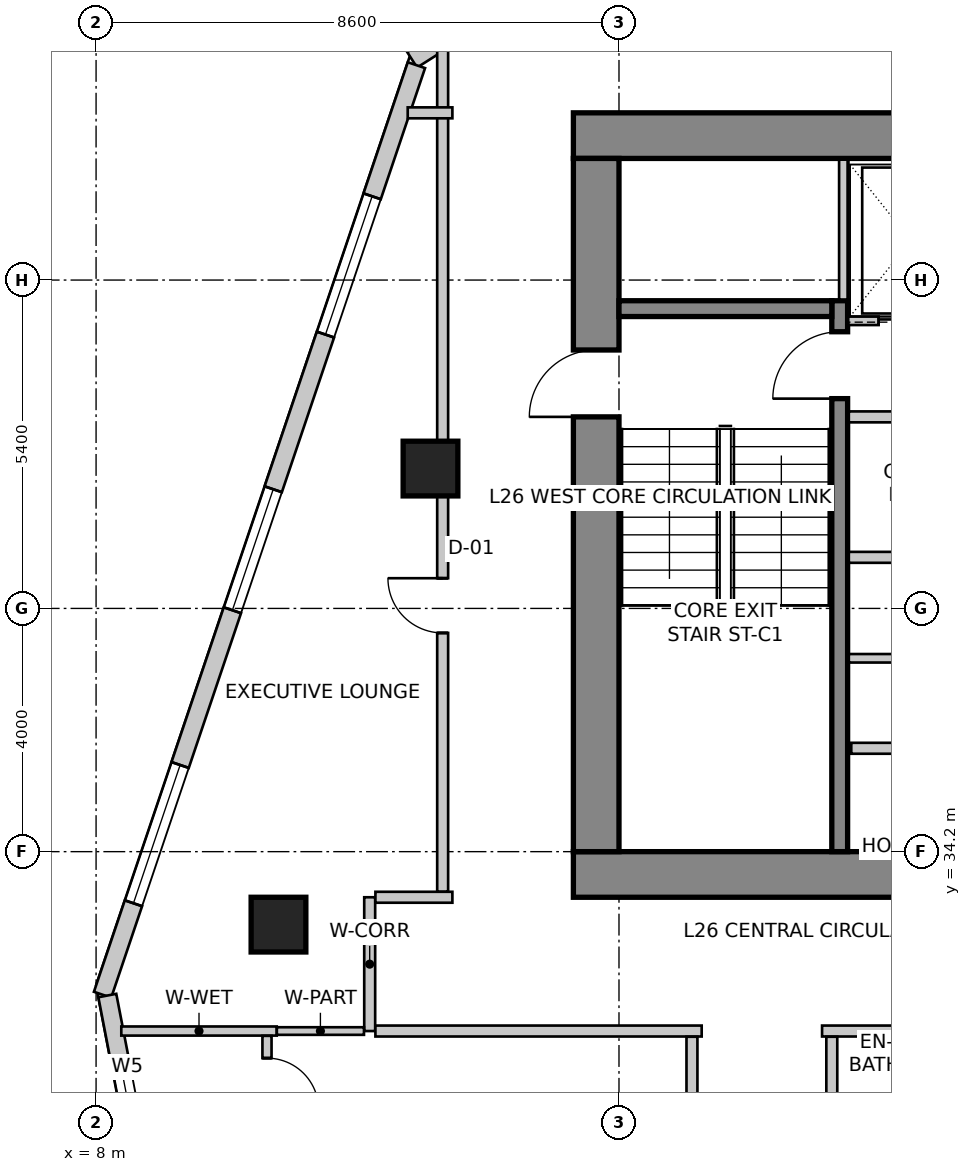
"""IFC4 building model, lengths in metres.
Left out: names, types, materials, properties, quantities, classifications, styles, units other than length and angle.
Written with IfcOpenShell. Run it as: python <this file> out.ifc"""

import sys

from ifc_helpers import new_model, si_unit, direction, frame, frame_2d, origin, origin_2d, place, context, subcontext, project, spatial, rectangle, extrude, source, transform, mapped, element, fill, save


model = new_model("IFC4")
c1 = context("Model", 3, precision=1e-05, world=origin(), true_north=direction((0.0, 1.0)))
c2 = subcontext(c1, "Body", "Model", "MODEL_VIEW")
j1 = project(units=[si_unit("LENGTHUNIT", "METRE"), si_unit("PLANEANGLEUNIT", "RADIAN")], contexts=[c1])
p1 = place(None, origin())
s1 = spatial("IfcSite", under=j1, at=p1, CompositionType="ELEMENT")
p2 = place(p1, origin())
s2 = spatial("IfcBuilding", under=s1, at=p2, CompositionType="ELEMENT")
p3 = place(p2, frame((0.0, 0.0, 110.6)))
s3 = spatial("IfcBuildingStorey", under=s2, at=p3, CompositionType="ELEMENT", Elevation=110.6)
p4 = place(p3, frame((15.85, 45.975, 0.0), z_axis=(0.0, 0.0, 1.0), x_axis=(1.0, 0.0, 0.0)))
e1 = element("IfcWall", 1, at=p4, inside=s3, PredefinedType="SHEAR", context=c2, shape_type="SweptSolid", body=[
    extrude(rectangle(XDim=15.9, YDim=0.75, at=frame_2d((7.95, 0.0))), origin(), (0.0, 0.0, 1.0), 3.6),
])
p5 = place(p3, frame((15.85, 33.825, 0.0), z_axis=(0.0, 0.0, 1.0), x_axis=(1.0, 0.0, 0.0)))
e2 = element("IfcWall", 2, at=p5, inside=s3, PredefinedType="SHEAR", context=c2, shape_type="SweptSolid", body=[
    extrude(rectangle(XDim=15.9, YDim=0.75, at=frame_2d((7.95, 0.0))), origin(), (0.0, 0.0, 1.0), 3.6),
])
m1 = source(origin(), c2, "Body", "SweptSolid", [
    extrude(rectangle(XDim=1.3, YDim=2.15, at=frame_2d((0.65, 1.075))), frame((0.0, 0.385, 0.0), z_axis=(0.0, -1.0, 0.0), x_axis=(1.0, 0.0, 0.0)), (0.0, 0.0, 1.0), 0.77),
])
p6 = place(p5, frame((10.08, 0.0, 0.0)))
e3 = element("IfcOpeningElement", 3, at=p6, cuts=e2, PredefinedType="OPENING", context=c2, shape_type="MappedRepresentation", body=[
    mapped(m1, transform((0.0, 0.0, 0.0), scale=1.0)),
])
p7 = place(p3, frame((16.225, 34.2, 0.0), z_axis=(0.0, 0.0, 1.0), x_axis=(0.0, 1.0, 0.0)))
e4 = element("IfcWall", 4, at=p7, inside=s3, PredefinedType="SHEAR", context=c2, shape_type="SweptSolid", body=[
    extrude(rectangle(XDim=11.4, YDim=0.75, at=frame_2d((5.7, 0.0))), origin(), (0.0, 0.0, 1.0), 3.6),
])
m2 = source(origin(), c2, "Body", "SweptSolid", [
    extrude(rectangle(XDim=1.1, YDim=2.15, at=frame_2d((0.55, 1.075))), frame((0.0, 0.385, 0.0), z_axis=(0.0, -1.0, 0.0), x_axis=(1.0, 0.0, 0.0)), (0.0, 0.0, 1.0), 0.77),
])
p8 = place(p7, frame((7.15, 0.0, 0.0)))
e5 = element("IfcOpeningElement", 5, at=p8, cuts=e4, PredefinedType="OPENING", context=c2, shape_type="MappedRepresentation", body=[
    mapped(m2, transform((0.0, 0.0, 0.0), scale=1.0)),
])
p9 = place(p3, frame((20.23, 34.2, 0.0), z_axis=(0.0, 0.0, 1.0), x_axis=(0.0, 1.0, 0.0)))
e6 = element("IfcWall", 6, at=p9, inside=s3, PredefinedType="SHEAR", context=c2, shape_type="SweptSolid", body=[
    extrude(rectangle(XDim=9.06, YDim=0.26, at=frame_2d((4.53, 0.0))), origin(), (0.0, 0.0, 1.0), 3.6),
])
m3 = source(origin(), c2, "Body", "SweptSolid", [
    extrude(rectangle(XDim=1.1, YDim=2.15, at=frame_2d((0.55, 1.075))), frame((0.0, 0.14, 0.0), z_axis=(0.0, -1.0, 0.0), x_axis=(1.0, 0.0, 0.0)), (0.0, 0.0, 1.0), 0.28),
])
p10 = place(p9, frame((7.45, 0.0, 0.0)))
e7 = element("IfcOpeningElement", 7, at=p10, cuts=e6, PredefinedType="OPENING", context=c2, shape_type="MappedRepresentation", body=[
    mapped(m3, transform((0.0, 0.0, 0.0), scale=1.0)),
])
p11 = place(p3, frame((16.6, 43.13, 0.0), z_axis=(0.0, 0.0, 1.0), x_axis=(1.0, 0.0, 0.0)))
e8 = element("IfcWall", 8, at=p11, inside=s3, PredefinedType="SHEAR", context=c2, shape_type="SweptSolid", body=[
    extrude(rectangle(XDim=3.5, YDim=0.26, at=frame_2d((1.75, 0.0))), origin(), (0.0, 0.0, 1.0), 3.6),
])
m4 = source(origin(), c2, "Body", "SweptSolid", [
    extrude(rectangle(XDim=0.9, YDim=0.9, at=origin_2d()), origin(), (0.0, 0.0, 1.0), 3.6),
])
for number, where, z_axis, x_axis in (
    (9, (11.0, 33.0, 0.0), (0.0, 0.0, 1.0), (1.0, 0.0, 0.0)),
    (10, (13.5, 40.5, 0.0), (0.0, 0.0, 1.0), (1.0, 0.0, 0.0)),
):
    element("IfcColumn", number, at=place(p3, frame(where, z_axis=z_axis, x_axis=x_axis)), inside=s3, PredefinedType="COLUMN", context=c2, shape_type="MappedRepresentation", body=[
        mapped(m4, transform((0.0, 0.0, 0.0), scale=1.0)),
    ])
p12 = place(p3, frame((21.875, 52.742, 0.0), z_axis=(0.0, 0.0, 1.0), x_axis=(-0.843662465249, -0.536873956092, 0.0)))
e11 = element("IfcWall", 11, at=p12, inside=s3, PredefinedType="SOLIDWALL", context=c2, shape_type="SweptSolid", body=[
    extrude(rectangle(XDim=10.284, YDim=0.3, at=frame_2d((5.142, 0.0))), origin(), (0.0, 0.0, 1.0), 3.35),
])
m5 = source(origin(), c2, "Body", "SweptSolid", [
    extrude(rectangle(XDim=2.1, YDim=2.0, at=frame_2d((1.05, 1.0))), frame((0.0, 0.16, 0.0), z_axis=(0.0, -1.0, 0.0), x_axis=(1.0, 0.0, 0.0)), (0.0, 0.0, 1.0), 0.32),
])
p13 = place(p12, frame((2.806, 0.0, 0.85)))
e12 = element("IfcOpeningElement", 12, at=p13, cuts=e11, PredefinedType="OPENING", context=c2, shape_type="MappedRepresentation", body=[
    mapped(m5, transform((0.0, 0.0, 0.0), scale=1.0)),
])
m6 = source(origin(), c2, "Body", "SweptSolid", [
    extrude(rectangle(XDim=1.2, YDim=1.6, at=frame_2d((0.6, 0.8))), frame((0.0, 0.16, 0.0), z_axis=(0.0, -1.0, 0.0), x_axis=(1.0, 0.0, 0.0)), (0.0, 0.0, 1.0), 0.32),
])
p14 = place(p12, frame((8.087, 0.0, 0.85)))
e13 = element("IfcOpeningElement", 13, at=p14, cuts=e11, PredefinedType="OPENING", context=c2, shape_type="MappedRepresentation", body=[
    mapped(m6, transform((0.0, 0.0, 0.0), scale=1.0)),
])
p15 = place(p3, frame((13.269, 47.134, 0.0), z_axis=(0.0, 0.0, 1.0), x_axis=(-0.319929596295, -0.947441319246, 0.0)))
e14 = element("IfcWall", 14, at=p15, inside=s3, PredefinedType="SOLIDWALL", context=c2, shape_type="SweptSolid", body=[
    extrude(rectangle(XDim=16.134, YDim=0.3, at=frame_2d((8.067, 0.0))), origin(), (0.0, 0.0, 1.0), 3.35),
])
m7 = source(origin(), c2, "Body", "SweptSolid", [
    extrude(rectangle(XDim=2.4, YDim=2.2, at=frame_2d((1.2, 1.1))), frame((0.0, 0.16, 0.0), z_axis=(0.0, -1.0, 0.0), x_axis=(1.0, 0.0, 0.0)), (0.0, 0.0, 1.0), 0.32),
])
p16 = place(p15, frame((2.276, 0.0, 0.85)))
e15 = element("IfcOpeningElement", 15, at=p16, cuts=e14, PredefinedType="OPENING", context=c2, shape_type="MappedRepresentation", body=[
    mapped(m7, transform((0.0, 0.0, 0.0), scale=1.0)),
])
p17 = place(p15, frame((7.361, 0.0, 0.85)))
e16 = element("IfcOpeningElement", 16, at=p17, cuts=e14, PredefinedType="OPENING", context=c2, shape_type="MappedRepresentation", body=[
    mapped(m5, transform((0.0, 0.0, 0.0), scale=1.0)),
])
p18 = place(p15, frame((12.147, 0.0, 0.85)))
e17 = element("IfcOpeningElement", 17, at=p18, cuts=e14, PredefinedType="OPENING", context=c2, shape_type="MappedRepresentation", body=[
    mapped(m7, transform((0.0, 0.0, 0.0), scale=1.0)),
])
p19 = place(p3, frame((8.185, 31.834, 0.0), z_axis=(0.0, 0.0, 1.0), x_axis=(0.189707113148, -0.981840725994, 0.0)))
e18 = element("IfcWall", 18, at=p19, inside=s3, PredefinedType="SOLIDWALL", context=c2, shape_type="SweptSolid", body=[
    extrude(rectangle(XDim=21.221, YDim=0.3, at=frame_2d((10.611, 0.0))), origin(), (0.0, 0.0, 1.0), 3.35),
])
p20 = place(p19, frame((1.127, 0.0, 0.85)))
e19 = element("IfcOpeningElement", 19, at=p20, cuts=e18, PredefinedType="OPENING", context=c2, shape_type="MappedRepresentation", body=[
    mapped(m6, transform((0.0, 0.0, 0.0), scale=1.0)),
])
p21 = place(p19, frame((4.369, 0.0, 0.85)))
e20 = element("IfcOpeningElement", 20, at=p21, cuts=e18, PredefinedType="OPENING", context=c2, shape_type="MappedRepresentation", body=[
    mapped(m5, transform((0.0, 0.0, 0.0), scale=1.0)),
])
p22 = place(p19, frame((8.521, 0.0, 0.85)))
e21 = element("IfcOpeningElement", 21, at=p22, cuts=e18, PredefinedType="OPENING", context=c2, shape_type="MappedRepresentation", body=[
    mapped(m6, transform((0.0, 0.0, 0.0), scale=1.0)),
])
p23 = place(p19, frame((12.021, 0.0, 0.85)))
e22 = element("IfcOpeningElement", 22, at=p23, cuts=e18, PredefinedType="OPENING", context=c2, shape_type="MappedRepresentation", body=[
    mapped(m5, transform((0.0, 0.0, 0.0), scale=1.0)),
])
p24 = place(p19, frame((17.091, 0.0, 0.85)))
e23 = element("IfcOpeningElement", 23, at=p24, cuts=e18, PredefinedType="OPENING", context=c2, shape_type="MappedRepresentation", body=[
    mapped(m7, transform((0.0, 0.0, 0.0), scale=1.0)),
])
p25 = place(p3, frame((20.37, 42.93, 0.0), z_axis=(0.0, 0.0, 1.0), x_axis=(1.0, 0.0, 0.0)))
e24 = element("IfcWall", 24, at=p25, inside=s3, PredefinedType="SOLIDWALL", context=c2, shape_type="SweptSolid", body=[
    extrude(rectangle(XDim=6.86, YDim=0.14, at=frame_2d((3.43, 0.0))), origin(), (0.0, 0.0, 1.0), 3.35),
])
m8 = source(origin(), c2, "Body", "SweptSolid", [
    extrude(rectangle(XDim=1.1, YDim=2.15, at=frame_2d((0.55, 1.075))), frame((0.0, 0.08, 0.0), z_axis=(0.0, -1.0, 0.0), x_axis=(1.0, 0.0, 0.0)), (0.0, 0.0, 1.0), 0.16),
])
p26 = place(p25, frame((0.5, 0.0, 0.0)))
e25 = element("IfcOpeningElement", 25, at=p26, cuts=e24, PredefinedType="OPENING", context=c2, shape_type="MappedRepresentation", body=[
    mapped(m8, transform((0.0, 0.0, 0.0), scale=1.0)),
])
p27 = place(p25, frame((2.7, 0.0, 0.0)))
e26 = element("IfcOpeningElement", 26, at=p27, cuts=e24, PredefinedType="OPENING", context=c2, shape_type="MappedRepresentation", body=[
    mapped(m8, transform((0.0, 0.0, 0.0), scale=1.0)),
])
p28 = place(p25, frame((5.1, 0.0, 0.0)))
e27 = element("IfcOpeningElement", 27, at=p28, cuts=e24, PredefinedType="OPENING", context=c2, shape_type="MappedRepresentation", body=[
    mapped(m8, transform((0.0, 0.0, 0.0), scale=1.0)),
])
p29 = place(p3, frame((20.29, 43.28, 0.0), z_axis=(0.0, 0.0, 1.0), x_axis=(0.0, 1.0, 0.0)))
e28 = element("IfcWall", 28, at=p29, inside=s3, PredefinedType="SOLIDWALL", context=c2, shape_type="SweptSolid", body=[
    extrude(rectangle(XDim=2.3, YDim=0.14, at=frame_2d((1.15, 0.0))), origin(), (0.0, 0.0, 1.0), 3.35),
])
p30 = place(p3, frame((20.38, 37.38, 0.0), z_axis=(0.0, 0.0, 1.0), x_axis=(1.0, 0.0, 0.0)))
e29 = element("IfcWall", 29, at=p30, inside=s3, PredefinedType="SOLIDWALL", context=c2, shape_type="SweptSolid", body=[
    extrude(rectangle(XDim=5.75, YDim=0.14, at=frame_2d((2.875, 0.0))), origin(), (0.0, 0.0, 1.0), 3.35),
])
p31 = place(p3, frame((20.38, 39.04, 0.0), z_axis=(0.0, 0.0, 1.0), x_axis=(1.0, 0.0, 0.0)))
e30 = element("IfcWall", 30, at=p31, inside=s3, PredefinedType="SOLIDWALL", context=c2, shape_type="SweptSolid", body=[
    extrude(rectangle(XDim=5.75, YDim=0.18, at=frame_2d((2.875, 0.0))), origin(), (0.0, 0.0, 1.0), 3.35),
])
p32 = place(p3, frame((24.81, 41.35, 0.0), z_axis=(0.0, 0.0, 1.0), x_axis=(-1.0, 0.0, 0.0)))
e31 = element("IfcWall", 31, at=p32, inside=s3, PredefinedType="PARTITIONING", context=c2, shape_type="SweptSolid", body=[
    extrude(rectangle(XDim=4.43, YDim=0.18, at=frame_2d((2.215, 0.0))), origin(), (0.0, 0.0, 1.0), 3.35),
])
p33 = place(p3, frame((20.42, 35.9, 0.0), z_axis=(0.0, 0.0, 1.0), x_axis=(1.0, 0.0, 0.0)))
e32 = element("IfcWall", 32, at=p33, inside=s3, PredefinedType="PARTITIONING", context=c2, shape_type="SweptSolid", body=[
    extrude(rectangle(XDim=2.62, YDim=0.18, at=frame_2d((1.31, 0.0))), origin(), (0.0, 0.0, 1.0), 3.35),
])
m9 = source(origin(), c2, "Body", "SweptSolid", [
    extrude(rectangle(XDim=0.9, YDim=2.15, at=frame_2d((0.45, 1.075))), frame((0.0, 0.1, 0.0), z_axis=(0.0, -1.0, 0.0), x_axis=(1.0, 0.0, 0.0)), (0.0, 0.0, 1.0), 0.2),
])
p34 = place(p33, frame((0.796, 0.0, 0.0)))
e33 = element("IfcOpeningElement", 33, at=p34, cuts=e32, PredefinedType="OPENING", context=c2, shape_type="MappedRepresentation", body=[
    mapped(m9, transform((0.0, 0.0, 0.0), scale=1.0)),
])
p35 = place(p3, frame((12.5, 31.25, 0.0), z_axis=(0.0, 0.0, 1.0), x_axis=(0.0, 1.0, 0.0)))
e34 = element("IfcWall", 34, at=p35, inside=s3, PredefinedType="PARTITIONING", context=c2, shape_type="SweptSolid", body=[
    extrude(rectangle(XDim=2.2, YDim=0.18, at=frame_2d((1.1, 0.0))), origin(), (0.0, 0.0, 1.0), 3.034),
])
p36 = place(p3, frame((12.594, 33.45, 0.0), z_axis=(0.0, 0.0, 1.0), x_axis=(1.0, 0.0, 0.0)))
e35 = element("IfcWall", 35, at=p36, inside=s3, PredefinedType="PARTITIONING", context=c2, shape_type="SweptSolid", body=[
    extrude(rectangle(XDim=1.266, YDim=0.18, at=frame_2d((0.633, 0.0))), origin(), (0.0, 0.0, 1.0), 3.35),
])
p37 = place(p3, frame((17.96, 31.25, 0.0), z_axis=(0.0, 0.0, 1.0), x_axis=(-1.0, 0.0, 0.0)))
e36 = element("IfcWall", 36, at=p37, inside=s3, PredefinedType="PARTITIONING", context=c2, shape_type="SweptSolid", body=[
    extrude(rectangle(XDim=5.366, YDim=0.18, at=frame_2d((2.683, 0.0))), origin(), (0.0, 0.0, 1.0), 3.034),
])
p38 = place(p3, frame((22.66, 31.25, 0.0), z_axis=(0.0, 0.0, 1.0), x_axis=(-1.0, 0.0, 0.0)))
e37 = element("IfcWall", 37, at=p38, inside=s3, PredefinedType="PARTITIONING", context=c2, shape_type="SweptSolid", body=[
    extrude(rectangle(XDim=2.72, YDim=0.18, at=frame_2d((1.36, 0.0))), origin(), (0.0, 0.0, 1.0), 3.034),
])
p39 = place(p3, frame((13.7, 33.544, 0.0), z_axis=(0.0, 0.0, 1.0), x_axis=(0.0, 1.0, 0.0)))
e38 = element("IfcWall", 38, at=p39, inside=s3, PredefinedType="PARTITIONING", context=c2, shape_type="SweptSolid", body=[
    extrude(rectangle(XDim=13.86, YDim=0.18, at=frame_2d((6.93, 0.0))), origin(), (0.0, 0.0, 1.0), 2.492),
])
p40 = place(p39, frame((4.253, 0.0, 0.0)))
e39 = element("IfcOpeningElement", 39, at=p40, cuts=e38, PredefinedType="OPENING", context=c2, shape_type="MappedRepresentation", body=[
    mapped(m9, transform((0.0, 0.0, 0.0), scale=1.0)),
])
p41 = place(p3, frame((13.86, 46.35, 0.0), z_axis=(0.0, 0.0, 1.0), x_axis=(-1.0, 0.0, 0.0)))
e40 = element("IfcWall", 40, at=p41, inside=s3, PredefinedType="PARTITIONING", context=c2, shape_type="SweptSolid", body=[
    extrude(rectangle(XDim=0.735, YDim=0.18, at=frame_2d((0.367, 0.0))), origin(), (0.0, 0.0, 1.0), 3.35),
])
p42 = place(p3, frame((10.971, 31.25, 0.0), z_axis=(0.0, 0.0, 1.0), x_axis=(-1.0, 0.0, 0.0)))
e41 = element("IfcWall", 41, at=p42, inside=s3, PredefinedType="PARTITIONING", context=c2, shape_type="SweptSolid", body=[
    extrude(rectangle(XDim=2.556, YDim=0.15, at=frame_2d((1.278, 0.0))), origin(), (0.0, 0.0, 1.0), 2.492),
])
p43 = place(p3, frame((12.406, 31.25, 0.0), z_axis=(0.0, 0.0, 1.0), x_axis=(-1.0, 0.0, 0.0)))
e42 = element("IfcWall", 42, at=p43, inside=s3, PredefinedType="PARTITIONING", context=c2, shape_type="SweptSolid", body=[
    extrude(rectangle(XDim=1.433, YDim=0.125, at=frame_2d((0.717, 0.0))), origin(), (0.0, 0.0, 1.0), 2.492),
])
p44 = place(p3, frame((17.8, 24.162, 0.0), z_axis=(0.0, 0.0, 1.0), x_axis=(0.0, 1.0, 0.0)))
e43 = element("IfcWall", 43, at=p44, inside=s3, PredefinedType="PARTITIONING", context=c2, shape_type="SweptSolid", body=[
    extrude(rectangle(XDim=6.994, YDim=0.18, at=frame_2d((3.497, 0.0))), origin(), (0.0, 0.0, 1.0), 2.803),
])
p45 = place(p44, frame((3.047, 0.0, 0.0)))
e44 = element("IfcOpeningElement", 44, at=p45, cuts=e43, PredefinedType="OPENING", context=c2, shape_type="MappedRepresentation", body=[
    mapped(m9, transform((0.0, 0.0, 0.0), scale=1.0)),
])
p46 = place(p3, frame((20.1, 31.156, 0.0), z_axis=(0.0, 0.0, 1.0), x_axis=(0.0, -1.0, 0.0)))
e45 = element("IfcWall", 45, at=p46, inside=s3, PredefinedType="PARTITIONING", context=c2, shape_type="SweptSolid", body=[
    extrude(rectangle(XDim=2.266, YDim=0.18, at=frame_2d((1.133, 0.0))), origin(), (0.0, 0.0, 1.0), 3.034),
])
p47 = place(p3, frame((10.811, 31.171, 0.0), z_axis=(0.0, 0.0, 1.0), x_axis=(0.0, -1.0, 0.0)))
e46 = element("IfcWall", 46, at=p47, inside=s3, PredefinedType="PARTITIONING", context=c2, shape_type="SweptSolid", body=[
    extrude(rectangle(XDim=2.101, YDim=0.15, at=frame_2d((1.05, 0.0))), origin(), (0.0, 0.0, 1.0), 2.492),
])
m10 = source(origin(), c2, "Body", "SweptSolid", [
    extrude(rectangle(XDim=0.85, YDim=2.15, at=frame_2d((0.425, 1.075))), frame((0.0, 0.085, 0.0), z_axis=(0.0, -1.0, 0.0), x_axis=(1.0, 0.0, 0.0)), (0.0, 0.0, 1.0), 0.17),
])
p48 = place(p47, frame((0.366, 0.0, 0.0)))
e47 = element("IfcOpeningElement", 47, at=p48, cuts=e46, PredefinedType="OPENING", context=c2, shape_type="MappedRepresentation", body=[
    mapped(m10, transform((0.0, 0.0, 0.0), scale=1.0)),
])
m11 = source(origin(), c2, "Body", "SweptSolid", [
    extrude(rectangle(XDim=2.4, YDim=2.2, at=frame_2d((1.2, 1.1))), frame((0.0, -0.015, 0.0), z_axis=(0.0, -1.0, 0.0), x_axis=(1.0, 0.0, 0.0)), (0.0, 0.0, 1.0), 0.06),
])
p49 = place(p16, origin())
e48 = element("IfcWindow", 48, at=p49, inside=s3, PartitioningType="SINGLE_PANEL", PredefinedType="WINDOW", context=c2, shape_type="MappedRepresentation", body=[
    mapped(m11, transform((0.0, 0.0, 0.0), scale=1.0)),
])
fill(e15, e48)
m12 = source(origin(), c2, "Body", "SweptSolid", [
    extrude(rectangle(XDim=2.1, YDim=2.0, at=frame_2d((1.05, 1.0))), frame((0.0, -0.015, 0.0), z_axis=(0.0, -1.0, 0.0), x_axis=(1.0, 0.0, 0.0)), (0.0, 0.0, 1.0), 0.06),
])
p50 = place(p17, origin())
e49 = element("IfcWindow", 49, at=p50, inside=s3, PartitioningType="SINGLE_PANEL", PredefinedType="WINDOW", context=c2, shape_type="MappedRepresentation", body=[
    mapped(m12, transform((0.0, 0.0, 0.0), scale=1.0)),
])
fill(e16, e49)
p51 = place(p18, origin())
e50 = element("IfcWindow", 50, at=p51, inside=s3, PartitioningType="SINGLE_PANEL", PredefinedType="WINDOW", context=c2, shape_type="MappedRepresentation", body=[
    mapped(m11, transform((0.0, 0.0, 0.0), scale=1.0)),
])
fill(e17, e50)
m13 = source(origin(), c2, "Body", "SweptSolid", [
    extrude(rectangle(XDim=1.2, YDim=1.6, at=frame_2d((0.6, 0.8))), frame((0.0, -0.015, 0.0), z_axis=(0.0, -1.0, 0.0), x_axis=(1.0, 0.0, 0.0)), (0.0, 0.0, 1.0), 0.06),
])
p52 = place(p20, origin())
e51 = element("IfcWindow", 51, at=p52, inside=s3, PartitioningType="SINGLE_PANEL", PredefinedType="WINDOW", context=c2, shape_type="MappedRepresentation", body=[
    mapped(m13, transform((0.0, 0.0, 0.0), scale=1.0)),
])
fill(e19, e51)
m14 = source(origin(), c2, "Body", "SweptSolid", [
    extrude(rectangle(XDim=1.1, YDim=2.15, at=frame_2d((0.55, 1.075))), frame((0.0, 0.025, 0.0), z_axis=(0.0, -1.0, 0.0), x_axis=(1.0, 0.0, 0.0)), (0.0, 0.0, 1.0), 0.05),
])
p53 = place(p26, origin())
e52 = element("IfcDoor", 52, at=p53, inside=s3, OperationType="SLIDING_TO_LEFT", PredefinedType="DOOR", context=c2, shape_type="MappedRepresentation", body=[
    mapped(m14, transform((0.0, 0.0, 0.0), scale=1.0)),
])
fill(e25, e52)
m15 = source(origin(), c2, "Body", "SweptSolid", [
    extrude(rectangle(XDim=1.1, YDim=2.15, at=frame_2d((0.55, 1.075))), frame((0.0, 0.025, 0.0), z_axis=(0.0, -1.0, 0.0), x_axis=(1.0, 0.0, 0.0)), (0.0, 0.0, 1.0), 0.05),
])
p54 = place(p10, origin())
e53 = element("IfcDoor", 53, at=p54, inside=s3, OperationType="SINGLE_SWING_LEFT", PredefinedType="DOOR", context=c2, shape_type="MappedRepresentation", body=[
    mapped(m15, transform((0.0, 0.0, 0.0), scale=1.0)),
])
fill(e7, e53)
p55 = place(p8, origin())
e54 = element("IfcDoor", 54, at=p55, inside=s3, OperationType="SINGLE_SWING_LEFT", PredefinedType="DOOR", context=c2, shape_type="MappedRepresentation", body=[
    mapped(m15, transform((0.0, 0.0, 0.0), scale=1.0)),
])
fill(e5, e54)
m16 = source(origin(), c2, "Body", "SweptSolid", [
    extrude(rectangle(XDim=0.9, YDim=2.15, at=frame_2d((0.45, 1.075))), frame((0.0, 0.025, 0.0), z_axis=(0.0, -1.0, 0.0), x_axis=(1.0, 0.0, 0.0)), (0.0, 0.0, 1.0), 0.05),
])
p56 = place(p40, origin())
e55 = element("IfcDoor", 55, at=p56, inside=s3, OperationType="SINGLE_SWING_RIGHT", PredefinedType="DOOR", context=c2, shape_type="MappedRepresentation", body=[
    mapped(m16, transform((0.0, 0.0, 0.0), scale=1.0)),
])
fill(e39, e55)
m17 = source(origin(), c2, "Body", "SweptSolid", [
    extrude(rectangle(XDim=0.85, YDim=2.15, at=frame_2d((0.425, 1.075))), frame((0.0, 0.025, 0.0), z_axis=(0.0, -1.0, 0.0), x_axis=(1.0, 0.0, 0.0)), (0.0, 0.0, 1.0), 0.05),
])
p57 = place(p48, origin())
e56 = element("IfcDoor", 56, at=p57, inside=s3, OperationType="SINGLE_SWING_RIGHT", PredefinedType="DOOR", context=c2, shape_type="MappedRepresentation", body=[
    mapped(m17, transform((0.0, 0.0, 0.0), scale=1.0)),
])
fill(e47, e56)
save(model, sys.argv[1])
